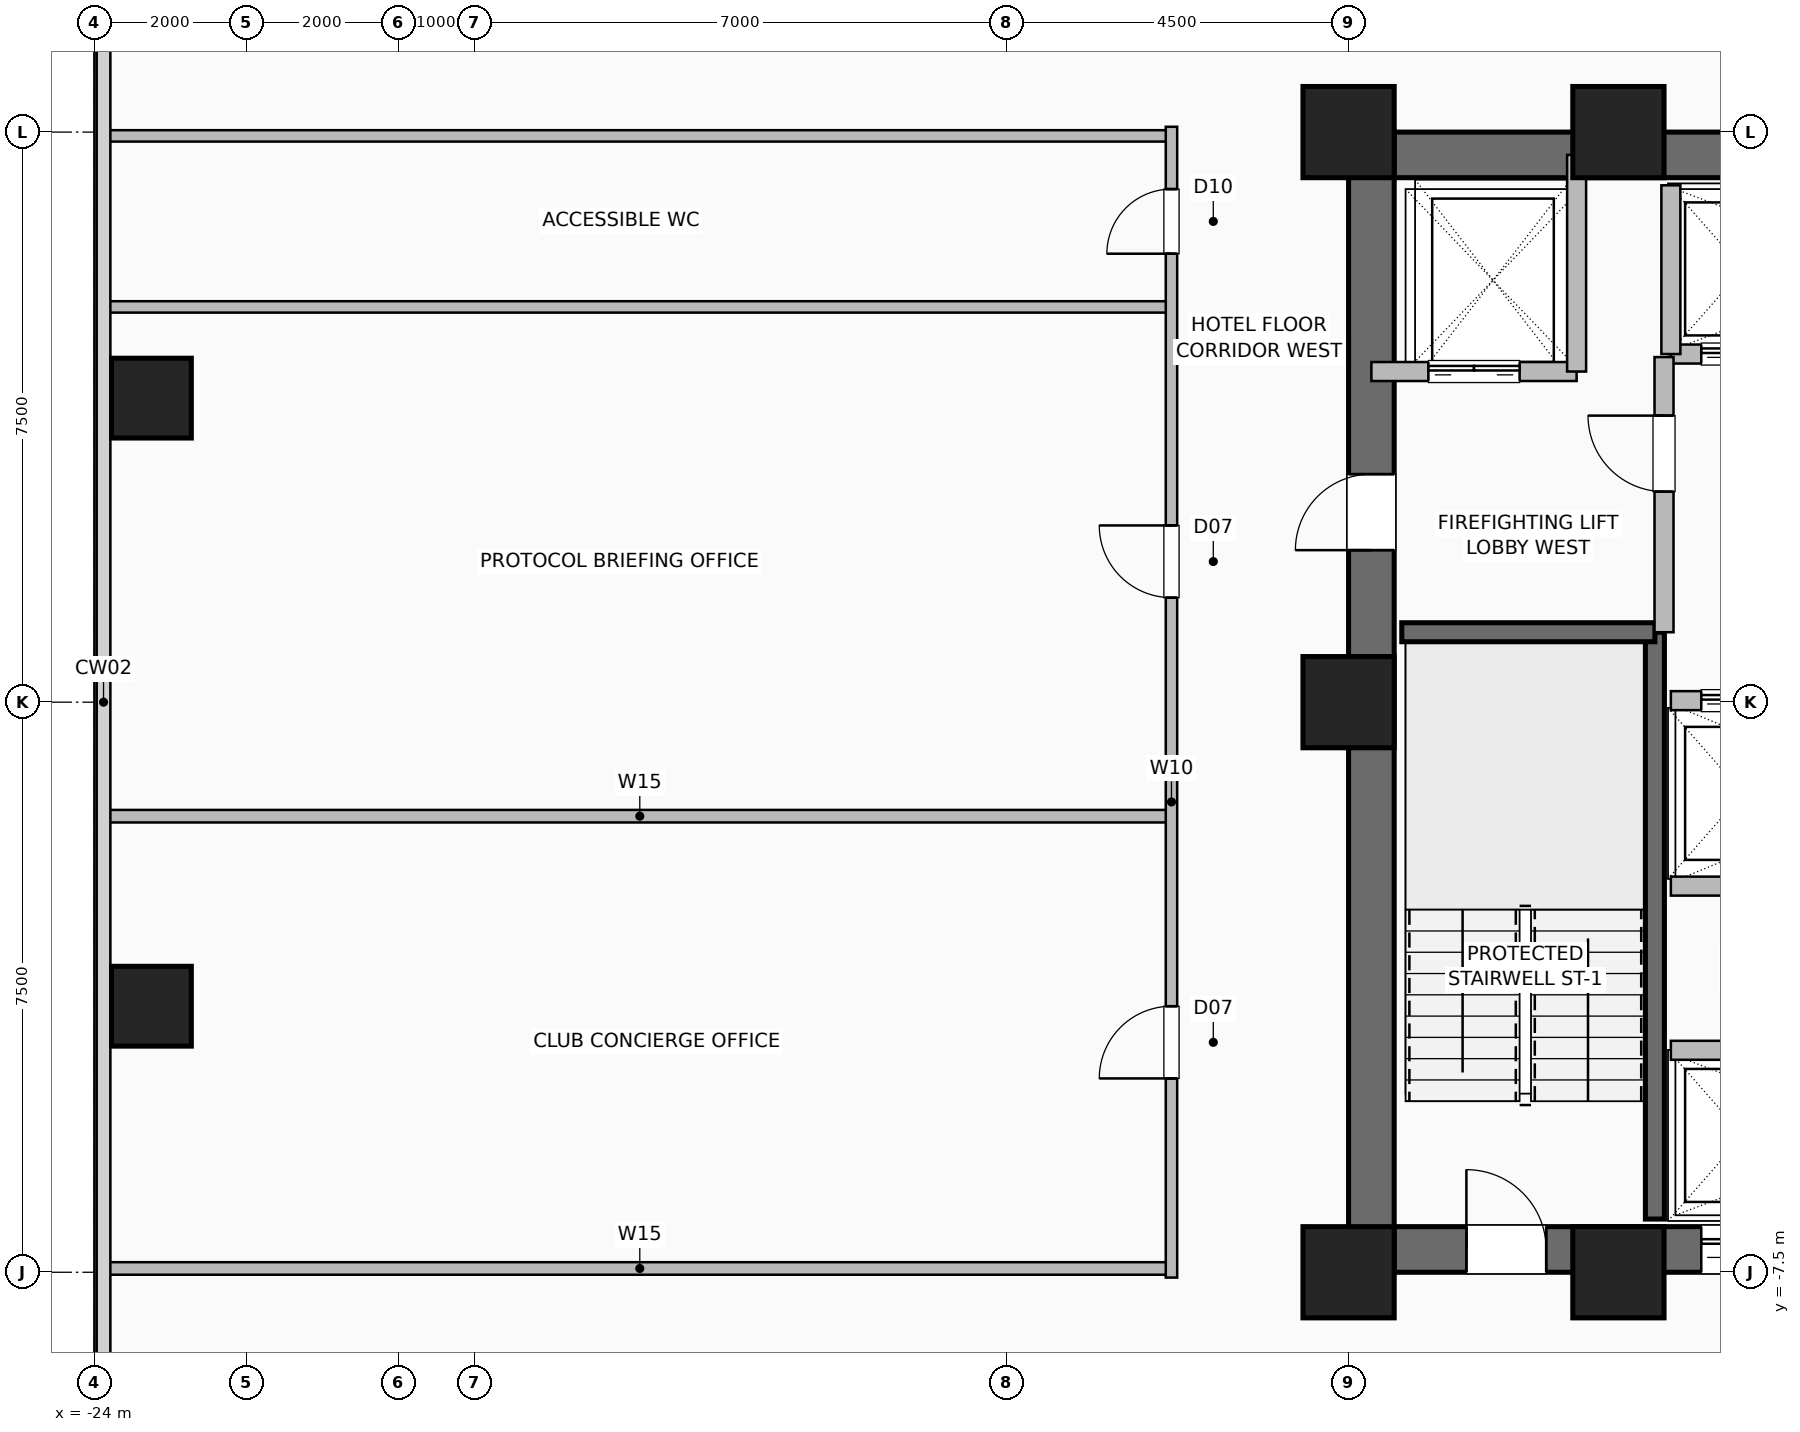
"""IFC4 building model, lengths in metres.
Left out: names, types, materials, properties, quantities, classifications, styles, units other than length and angle.
Written with IfcOpenShell. Run it as: python <this file> out.ifc"""

import sys

from ifc_helpers import new_model, si_unit, direction, frame, frame_2d, origin, origin_2d, place, context, subcontext, project, spatial, rectangle, hollow_rectangle, extrude, element, fill, save


model = new_model("IFC4")
c1 = context("Model", 3, precision=1e-05, world=origin(), true_north=direction((0.0, 1.0)))
c2 = subcontext(c1, "Body", "Model", "MODEL_VIEW")
j1 = project(units=[si_unit("LENGTHUNIT", "METRE"), si_unit("PLANEANGLEUNIT", "RADIAN")], contexts=[c1])
p1 = place(None, origin())
s1 = spatial("IfcSite", under=j1, at=p1, CompositionType="ELEMENT")
p2 = place(p1, origin())
s2 = spatial("IfcBuilding", under=s1, at=p2, CompositionType="ELEMENT")
p3 = place(p2, frame((0.0, 0.0, 62.0)))
s3 = spatial("IfcBuildingStorey", under=s2, at=p3, CompositionType="ELEMENT", Elevation=62.0)
for number, where, z_axis, x_axis in (
    (1, (-7.5, -7.5, 0.0), (0.0, 0.0, 1.0), (1.0, 0.0, 0.0)),
    (2, (-3.95, -7.5, 0.0), (0.0, 0.0, 1.0), (1.0, 0.0, 0.0)),
    (3, (-3.95, 7.5, 0.0), (0.0, 0.0, 1.0), (1.0, 0.0, 0.0)),
    (4, (-7.5, 7.5, 0.0), (0.0, 0.0, 1.0), (1.0, 0.0, 0.0)),
    (5, (-7.5, 0.0, 0.0), (0.0, 0.0, 1.0), (1.0, 0.0, 0.0)),
):
    element("IfcColumn", number, at=place(p3, frame(where, z_axis=z_axis, x_axis=x_axis)), inside=s3, PredefinedType="COLUMN", context=c2, shape_type="SweptSolid", body=[
        extrude(hollow_rectangle(XDim=1.2, YDim=1.2, WallThickness=0.055, at=origin_2d()), origin(), (0.0, 0.0, 1.0), 3.5),
    ])
for number, where, z_axis, x_axis in (
    (6, (-23.25, -4.0, 0.0), (0.0, 0.0, 1.0), (1.0, 0.0, 0.0)),
    (7, (-23.25, 4.0, 0.0), (0.0, 0.0, 1.0), (1.0, 0.0, 0.0)),
):
    element("IfcColumn", number, at=place(p3, frame(where, z_axis=z_axis, x_axis=x_axis)), inside=s3, PredefinedType="COLUMN", context=c2, shape_type="SweptSolid", body=[
        extrude(hollow_rectangle(XDim=1.05, YDim=1.05, WallThickness=0.05, at=origin_2d()), origin(), (0.0, 0.0, 1.0), 3.5),
    ])
p4 = place(p3, frame((-7.5, -7.2, 0.0), z_axis=(0.0, 0.0, 1.0), x_axis=(1.0, 0.0, 0.0)))
e8 = element("IfcWall", 8, at=p4, inside=s3, PredefinedType="SHEAR", context=c2, shape_type="SweptSolid", body=[
    extrude(rectangle(XDim=15.0, YDim=0.6, at=frame_2d((7.5, 0.0))), origin(), (0.0, 0.0, 1.0), 3.25),
])
p5 = place(p4, frame((1.55, 0.0, 0.0)))
e9 = element("IfcOpeningElement", 9, at=p5, cuts=e8, PredefinedType="OPENING", context=c2, shape_type="SweptSolid", body=[
    extrude(rectangle(XDim=1.05, YDim=2.08, at=frame_2d((0.525, 1.04))), frame((0.0, 0.31, 0.0), z_axis=(0.0, -1.0, 0.0), x_axis=(1.0, 0.0, 0.0)), (0.0, 0.0, 1.0), 0.62),
])
p6 = place(p4, frame((12.4, 0.0, 0.0)))
e10 = element("IfcOpeningElement", 10, at=p6, cuts=e8, PredefinedType="OPENING", context=c2, shape_type="SweptSolid", body=[
    extrude(rectangle(XDim=1.05, YDim=2.08, at=frame_2d((0.525, 1.04))), frame((0.0, 0.31, 0.0), z_axis=(0.0, -1.0, 0.0), x_axis=(1.0, 0.0, 0.0)), (0.0, 0.0, 1.0), 0.62),
])
p7 = place(p4, frame((4.64, 0.0, 0.0)))
e11 = element("IfcOpeningElement", 11, at=p7, cuts=e8, PredefinedType="OPENING", context=c2, shape_type="SweptSolid", body=[
    extrude(rectangle(XDim=1.1, YDim=2.2, at=frame_2d((0.55, 1.1))), frame((0.0, 0.31, 0.0), z_axis=(0.0, -1.0, 0.0), x_axis=(1.0, 0.0, 0.0)), (0.0, 0.0, 1.0), 0.62),
])
p8 = place(p4, frame((6.52, 0.0, 0.0)))
e12 = element("IfcOpeningElement", 12, at=p8, cuts=e8, PredefinedType="OPENING", context=c2, shape_type="SweptSolid", body=[
    extrude(rectangle(XDim=1.1, YDim=2.2, at=frame_2d((0.55, 1.1))), frame((0.0, 0.31, 0.0), z_axis=(0.0, -1.0, 0.0), x_axis=(1.0, 0.0, 0.0)), (0.0, 0.0, 1.0), 0.62),
])
p9 = place(p4, frame((8.4, 0.0, 0.0)))
e13 = element("IfcOpeningElement", 13, at=p9, cuts=e8, PredefinedType="OPENING", context=c2, shape_type="SweptSolid", body=[
    extrude(rectangle(XDim=1.1, YDim=2.2, at=frame_2d((0.55, 1.1))), frame((0.0, 0.31, 0.0), z_axis=(0.0, -1.0, 0.0), x_axis=(1.0, 0.0, 0.0)), (0.0, 0.0, 1.0), 0.62),
])
p10 = place(p3, frame((-7.5, 7.2, 0.0), z_axis=(0.0, 0.0, 1.0), x_axis=(1.0, 0.0, 0.0)))
e14 = element("IfcWall", 14, at=p10, inside=s3, PredefinedType="SHEAR", context=c2, shape_type="SweptSolid", body=[
    extrude(rectangle(XDim=15.0, YDim=0.6, at=frame_2d((7.5, 0.0))), origin(), (0.0, 0.0, 1.0), 3.25),
])
p11 = place(p3, frame((-7.2, -7.5, 0.0), z_axis=(0.0, 0.0, 1.0), x_axis=(0.0, 1.0, 0.0)))
e15 = element("IfcWall", 15, at=p11, inside=s3, PredefinedType="SHEAR", context=c2, shape_type="SweptSolid", body=[
    extrude(rectangle(XDim=15.0, YDim=0.6, at=frame_2d((7.5, 0.0))), origin(), (0.0, 0.0, 1.0), 3.25),
])
p12 = place(p11, frame((9.5, 0.0, 0.0)))
e16 = element("IfcOpeningElement", 16, at=p12, cuts=e15, PredefinedType="OPENING", context=c2, shape_type="SweptSolid", body=[
    extrude(rectangle(XDim=1.0, YDim=2.08, at=frame_2d((0.5, 1.04))), frame((0.0, 0.31, 0.0), z_axis=(0.0, -1.0, 0.0), x_axis=(1.0, 0.0, 0.0)), (0.0, 0.0, 1.0), 0.62),
])
p13 = place(p3, frame((-3.47, -6.8, 0.0), z_axis=(0.0, 0.0, 1.0), x_axis=(0.0, 1.0, 0.0)))
e17 = element("IfcWall", 17, at=p13, inside=s3, PredefinedType="SHEAR", context=c2, shape_type="SweptSolid", body=[
    extrude(rectangle(XDim=7.72, YDim=0.25, at=frame_2d((3.86, 0.0))), origin(), (0.0, 0.0, 1.0), 3.25),
])
p14 = place(p3, frame((-6.8, 0.92, 0.0), z_axis=(0.0, 0.0, 1.0), x_axis=(1.0, 0.0, 0.0)))
e18 = element("IfcWall", 18, at=p14, inside=s3, PredefinedType="SHEAR", context=c2, shape_type="SweptSolid", body=[
    extrude(rectangle(XDim=3.33, YDim=0.25, at=frame_2d((1.665, 0.0))), origin(), (0.0, 0.0, 1.0), 3.25),
])
p15 = place(p3, frame((-3.26, -4.58, 0.0), z_axis=(0.0, 0.0, 1.0), x_axis=(1.0, 0.0, 0.0)))
e19 = element("IfcWall", 19, at=p15, inside=s3, PredefinedType="SHEAR", context=c2, shape_type="SweptSolid", body=[
    extrude(rectangle(XDim=5.64, YDim=0.25, at=frame_2d((2.82, 0.0))), origin(), (0.0, 0.0, 1.0), 3.25),
])
p16 = place(p3, frame((-3.26, 0.02, 0.0), z_axis=(0.0, 0.0, 1.0), x_axis=(1.0, 0.0, 0.0)))
e20 = element("IfcWall", 20, at=p16, inside=s3, PredefinedType="SHEAR", context=c2, shape_type="SweptSolid", body=[
    extrude(rectangle(XDim=5.64, YDim=0.25, at=frame_2d((2.82, 0.0))), origin(), (0.0, 0.0, 1.0), 3.25),
])
p17 = place(p16, frame((0.4, 0.0, 0.0)))
e21 = element("IfcOpeningElement", 21, at=p17, cuts=e20, PredefinedType="OPENING", context=c2, shape_type="SweptSolid", body=[
    extrude(rectangle(XDim=1.1, YDim=2.2, at=frame_2d((0.55, 1.1))), frame((0.0, 0.135, 0.0), z_axis=(0.0, -1.0, 0.0), x_axis=(1.0, 0.0, 0.0)), (0.0, 0.0, 1.0), 0.27),
])
p18 = place(p16, frame((2.28, 0.0, 0.0)))
e22 = element("IfcOpeningElement", 22, at=p18, cuts=e20, PredefinedType="OPENING", context=c2, shape_type="SweptSolid", body=[
    extrude(rectangle(XDim=1.1, YDim=2.2, at=frame_2d((0.55, 1.1))), frame((0.0, 0.135, 0.0), z_axis=(0.0, -1.0, 0.0), x_axis=(1.0, 0.0, 0.0)), (0.0, 0.0, 1.0), 0.27),
])
p19 = place(p16, frame((4.16, 0.0, 0.0)))
e23 = element("IfcOpeningElement", 23, at=p19, cuts=e20, PredefinedType="OPENING", context=c2, shape_type="SweptSolid", body=[
    extrude(rectangle(XDim=1.1, YDim=2.2, at=frame_2d((0.55, 1.1))), frame((0.0, 0.135, 0.0), z_axis=(0.0, -1.0, 0.0), x_axis=(1.0, 0.0, 0.0)), (0.0, 0.0, 1.0), 0.27),
])
p20 = place(p3, frame((-3.26, -2.42, 0.0), z_axis=(0.0, 0.0, 1.0), x_axis=(1.0, 0.0, 0.0)))
e24 = element("IfcWall", 24, at=p20, inside=s3, PredefinedType="SHEAR", context=c2, shape_type="SweptSolid", body=[
    extrude(rectangle(XDim=5.64, YDim=0.25, at=frame_2d((2.82, 0.0))), origin(), (0.0, 0.0, 1.0), 3.25),
])
p21 = place(p3, frame((-3.26, 4.58, 0.0), z_axis=(0.0, 0.0, 1.0), x_axis=(1.0, 0.0, 0.0)))
e25 = element("IfcWall", 25, at=p21, inside=s3, PredefinedType="SHEAR", context=c2, shape_type="SweptSolid", body=[
    extrude(rectangle(XDim=5.64, YDim=0.25, at=frame_2d((2.82, 0.0))), origin(), (0.0, 0.0, 1.0), 3.25),
])
p22 = place(p21, frame((0.4, 0.0, 0.0)))
e26 = element("IfcOpeningElement", 26, at=p22, cuts=e25, PredefinedType="OPENING", context=c2, shape_type="SweptSolid", body=[
    extrude(rectangle(XDim=1.1, YDim=2.2, at=frame_2d((0.55, 1.1))), frame((0.0, 0.135, 0.0), z_axis=(0.0, -1.0, 0.0), x_axis=(1.0, 0.0, 0.0)), (0.0, 0.0, 1.0), 0.27),
])
p23 = place(p21, frame((2.28, 0.0, 0.0)))
e27 = element("IfcOpeningElement", 27, at=p23, cuts=e25, PredefinedType="OPENING", context=c2, shape_type="SweptSolid", body=[
    extrude(rectangle(XDim=1.1, YDim=2.2, at=frame_2d((0.55, 1.1))), frame((0.0, 0.135, 0.0), z_axis=(0.0, -1.0, 0.0), x_axis=(1.0, 0.0, 0.0)), (0.0, 0.0, 1.0), 0.27),
])
p24 = place(p21, frame((4.16, 0.0, 0.0)))
e28 = element("IfcOpeningElement", 28, at=p24, cuts=e25, PredefinedType="OPENING", context=c2, shape_type="SweptSolid", body=[
    extrude(rectangle(XDim=1.1, YDim=2.2, at=frame_2d((0.55, 1.1))), frame((0.0, 0.135, 0.0), z_axis=(0.0, -1.0, 0.0), x_axis=(1.0, 0.0, 0.0)), (0.0, 0.0, 1.0), 0.27),
])
p25 = place(p3, frame((-3.26, 4.58, 0.0), z_axis=(0.0, 0.0, 1.0), x_axis=(0.0, 1.0, 0.0)))
e29 = element("IfcWall", 29, at=p25, inside=s3, PredefinedType="SHEAR", context=c2, shape_type="SweptSolid", body=[
    extrude(rectangle(XDim=2.22, YDim=0.25, at=frame_2d((1.11, 0.0))), origin(), (0.0, 0.0, 1.0), 3.25),
])
p26 = place(p3, frame((-7.2, 4.35, 0.0), z_axis=(0.0, 0.0, 1.0), x_axis=(1.0, 0.0, 0.0)))
e30 = element("IfcWall", 30, at=p26, inside=s3, PredefinedType="SHEAR", context=c2, shape_type="SweptSolid", body=[
    extrude(rectangle(XDim=2.7, YDim=0.25, at=frame_2d((1.35, 0.0))), origin(), (0.0, 0.0, 1.0), 3.25),
])
p27 = place(p26, frame((0.75, 0.0, 0.0)))
e31 = element("IfcOpeningElement", 31, at=p27, cuts=e30, PredefinedType="OPENING", context=c2, shape_type="SweptSolid", body=[
    extrude(rectangle(XDim=1.2, YDim=2.2, at=frame_2d((0.6, 1.1))), frame((0.0, 0.135, 0.0), z_axis=(0.0, -1.0, 0.0), x_axis=(1.0, 0.0, 0.0)), (0.0, 0.0, 1.0), 0.27),
])
p28 = place(p3, frame((-4.5, 4.35, 0.0), z_axis=(0.0, 0.0, 1.0), x_axis=(0.0, 1.0, 0.0)))
e32 = element("IfcWall", 32, at=p28, inside=s3, PredefinedType="SHEAR", context=c2, shape_type="SweptSolid", body=[
    extrude(rectangle(XDim=2.85, YDim=0.25, at=frame_2d((1.425, 0.0))), origin(), (0.0, 0.0, 1.0), 3.25),
])
p29 = place(p3, frame((-3.35, 0.92, 0.0), z_axis=(0.0, 0.0, 1.0), x_axis=(0.0, 1.0, 0.0)))
e33 = element("IfcWall", 33, at=p29, inside=s3, PredefinedType="SHEAR", context=c2, shape_type="SweptSolid", body=[
    extrude(rectangle(XDim=3.62, YDim=0.25, at=frame_2d((1.81, 0.0))), origin(), (0.0, 0.0, 1.0), 3.25),
])
p30 = place(p29, frame((1.85, 0.0, 0.0)))
e34 = element("IfcOpeningElement", 34, at=p30, cuts=e33, PredefinedType="OPENING", context=c2, shape_type="SweptSolid", body=[
    extrude(rectangle(XDim=1.0, YDim=2.08, at=frame_2d((0.5, 1.04))), frame((0.0, 0.135, 0.0), z_axis=(0.0, -1.0, 0.0), x_axis=(1.0, 0.0, 0.0)), (0.0, 0.0, 1.0), 0.27),
])
for number, where, z_axis, x_axis in (
    (35, (-23.82, -7.45, 0.0), (0.0, 0.0, 1.0), (1.0, 0.0, 0.0)),
    (36, (-23.82, -1.5, 0.0), (0.0, 0.0, 1.0), (1.0, 0.0, 0.0)),
):
    element("IfcWall", number, at=place(p3, frame(where, z_axis=z_axis, x_axis=x_axis)), inside=s3, PredefinedType="PLUMBINGWALL", context=c2, shape_type="SweptSolid", body=[
        extrude(rectangle(XDim=13.99, YDim=0.165, at=frame_2d((6.995, 0.0))), origin(), (0.0, 0.0, 1.0), 3.25),
    ])
for number, where, z_axis, x_axis in (
    (37, (-23.82, 5.2, 0.0), (0.0, 0.0, 1.0), (1.0, 0.0, 0.0)),
    (38, (-23.82, 7.45, 0.0), (0.0, 0.0, 1.0), (1.0, 0.0, 0.0)),
):
    element("IfcWall", number, at=place(p3, frame(where, z_axis=z_axis, x_axis=x_axis)), inside=s3, PredefinedType="PARTITIONING", context=c2, shape_type="SweptSolid", body=[
        extrude(rectangle(XDim=13.99, YDim=0.15, at=frame_2d((6.995, 0.0))), origin(), (0.0, 0.0, 1.0), 3.25),
    ])
p31 = place(p3, frame((-9.83, -7.57, 0.0), z_axis=(0.0, 0.0, 1.0), x_axis=(0.0, 1.0, 0.0)))
e39 = element("IfcWall", 39, at=p31, inside=s3, PredefinedType="PARTITIONING", context=c2, shape_type="SweptSolid", body=[
    extrude(rectangle(XDim=15.14, YDim=0.15, at=frame_2d((7.57, 0.0))), origin(), (0.0, 0.0, 1.0), 3.25),
])
p32 = place(p31, frame((2.62, 0.0, 0.0)))
e40 = element("IfcOpeningElement", 40, at=p32, cuts=e39, PredefinedType="OPENING", context=c2, shape_type="SweptSolid", body=[
    extrude(rectangle(XDim=0.95, YDim=2.06, at=frame_2d((0.475, 1.03))), frame((0.0, 0.085, 0.0), z_axis=(0.0, -1.0, 0.0), x_axis=(1.0, 0.0, 0.0)), (0.0, 0.0, 1.0), 0.17),
])
p33 = place(p31, frame((8.945, 0.0, 0.0)))
e41 = element("IfcOpeningElement", 41, at=p33, cuts=e39, PredefinedType="OPENING", context=c2, shape_type="SweptSolid", body=[
    extrude(rectangle(XDim=0.95, YDim=2.06, at=frame_2d((0.475, 1.03))), frame((0.0, 0.085, 0.0), z_axis=(0.0, -1.0, 0.0), x_axis=(1.0, 0.0, 0.0)), (0.0, 0.0, 1.0), 0.17),
])
p34 = place(p31, frame((13.47, 0.0, 0.0)))
e42 = element("IfcOpeningElement", 42, at=p34, cuts=e39, PredefinedType="OPENING", context=c2, shape_type="SweptSolid", body=[
    extrude(rectangle(XDim=0.85, YDim=2.05, at=frame_2d((0.425, 1.025))), frame((0.0, 0.085, 0.0), z_axis=(0.0, -1.0, 0.0), x_axis=(1.0, 0.0, 0.0)), (0.0, 0.0, 1.0), 0.17),
])
p35 = place(p5, origin())
e43 = element("IfcDoor", 43, at=p35, inside=s3, OperationType="SINGLE_SWING_LEFT", PredefinedType="DOOR", context=c2, shape_type="SweptSolid", body=[
    extrude(rectangle(XDim=1.05, YDim=2.08, at=frame_2d((0.525, 1.04))), frame((0.0, 0.025, 0.0), z_axis=(0.0, -1.0, 0.0), x_axis=(1.0, 0.0, 0.0)), (0.0, 0.0, 1.0), 0.05),
])
fill(e9, e43)
p36 = place(p12, origin())
e44 = element("IfcDoor", 44, at=p36, inside=s3, OperationType="SINGLE_SWING_LEFT", PredefinedType="DOOR", context=c2, shape_type="SweptSolid", body=[
    extrude(rectangle(XDim=1.0, YDim=2.08, at=frame_2d((0.5, 1.04))), frame((0.0, 0.025, 0.0), z_axis=(0.0, -1.0, 0.0), x_axis=(1.0, 0.0, 0.0)), (0.0, 0.0, 1.0), 0.05),
])
fill(e16, e44)
p37 = place(p7, origin())
e45 = element("IfcDoor", 45, at=p37, inside=s3, OperationType="DOUBLE_DOOR_SLIDING", PredefinedType="DOOR", context=c2, shape_type="SweptSolid", body=[
    extrude(rectangle(XDim=1.1, YDim=2.2, at=frame_2d((0.55, 1.1))), frame((0.0, 0.025, 0.0), z_axis=(0.0, -1.0, 0.0), x_axis=(1.0, 0.0, 0.0)), (0.0, 0.0, 1.0), 0.05),
])
fill(e11, e45)
p38 = place(p17, origin())
e46 = element("IfcDoor", 46, at=p38, inside=s3, OperationType="DOUBLE_DOOR_SLIDING", PredefinedType="DOOR", context=c2, shape_type="SweptSolid", body=[
    extrude(rectangle(XDim=1.1, YDim=2.2, at=frame_2d((0.55, 1.1))), frame((0.0, 0.025, 0.0), z_axis=(0.0, -1.0, 0.0), x_axis=(1.0, 0.0, 0.0)), (0.0, 0.0, 1.0), 0.05),
])
fill(e21, e46)
p39 = place(p22, origin())
e47 = element("IfcDoor", 47, at=p39, inside=s3, OperationType="DOUBLE_DOOR_SLIDING", PredefinedType="DOOR", context=c2, shape_type="SweptSolid", body=[
    extrude(rectangle(XDim=1.1, YDim=2.2, at=frame_2d((0.55, 1.1))), frame((0.0, 0.025, 0.0), z_axis=(0.0, -1.0, 0.0), x_axis=(1.0, 0.0, 0.0)), (0.0, 0.0, 1.0), 0.05),
])
fill(e26, e47)
p40 = place(p27, origin())
e48 = element("IfcDoor", 48, at=p40, inside=s3, OperationType="DOUBLE_DOOR_SLIDING", PredefinedType="DOOR", context=c2, shape_type="SweptSolid", body=[
    extrude(rectangle(XDim=1.2, YDim=2.2, at=frame_2d((0.6, 1.1))), frame((0.0, 0.025, 0.0), z_axis=(0.0, -1.0, 0.0), x_axis=(1.0, 0.0, 0.0)), (0.0, 0.0, 1.0), 0.05),
])
fill(e31, e48)
p41 = place(p30, origin())
e49 = element("IfcDoor", 49, at=p41, inside=s3, OperationType="SINGLE_SWING_RIGHT", PredefinedType="DOOR", context=c2, shape_type="SweptSolid", body=[
    extrude(rectangle(XDim=1.0, YDim=2.08, at=frame_2d((0.5, 1.04))), frame((0.0, 0.025, 0.0), z_axis=(0.0, -1.0, 0.0), x_axis=(1.0, 0.0, 0.0)), (0.0, 0.0, 1.0), 0.05),
])
fill(e34, e49)
p42 = place(p32, origin())
e50 = element("IfcDoor", 50, at=p42, inside=s3, OperationType="SINGLE_SWING_LEFT", PredefinedType="DOOR", context=c2, shape_type="SweptSolid", body=[
    extrude(rectangle(XDim=0.95, YDim=2.06, at=frame_2d((0.475, 1.03))), frame((0.0, 0.025, 0.0), z_axis=(0.0, -1.0, 0.0), x_axis=(1.0, 0.0, 0.0)), (0.0, 0.0, 1.0), 0.05),
])
fill(e40, e50)
p43 = place(p33, origin())
e51 = element("IfcDoor", 51, at=p43, inside=s3, OperationType="SINGLE_SWING_RIGHT", PredefinedType="DOOR", context=c2, shape_type="SweptSolid", body=[
    extrude(rectangle(XDim=0.95, YDim=2.06, at=frame_2d((0.475, 1.03))), frame((0.0, 0.025, 0.0), z_axis=(0.0, -1.0, 0.0), x_axis=(1.0, 0.0, 0.0)), (0.0, 0.0, 1.0), 0.05),
])
fill(e41, e51)
p44 = place(p34, origin())
e52 = element("IfcDoor", 52, at=p44, inside=s3, OperationType="SINGLE_SWING_LEFT", PredefinedType="DOOR", context=c2, shape_type="SweptSolid", body=[
    extrude(rectangle(XDim=0.85, YDim=2.05, at=frame_2d((0.425, 1.025))), frame((0.0, 0.025, 0.0), z_axis=(0.0, -1.0, 0.0), x_axis=(1.0, 0.0, 0.0)), (0.0, 0.0, 1.0), 0.05),
])
fill(e42, e52)
save(model, sys.argv[1])
